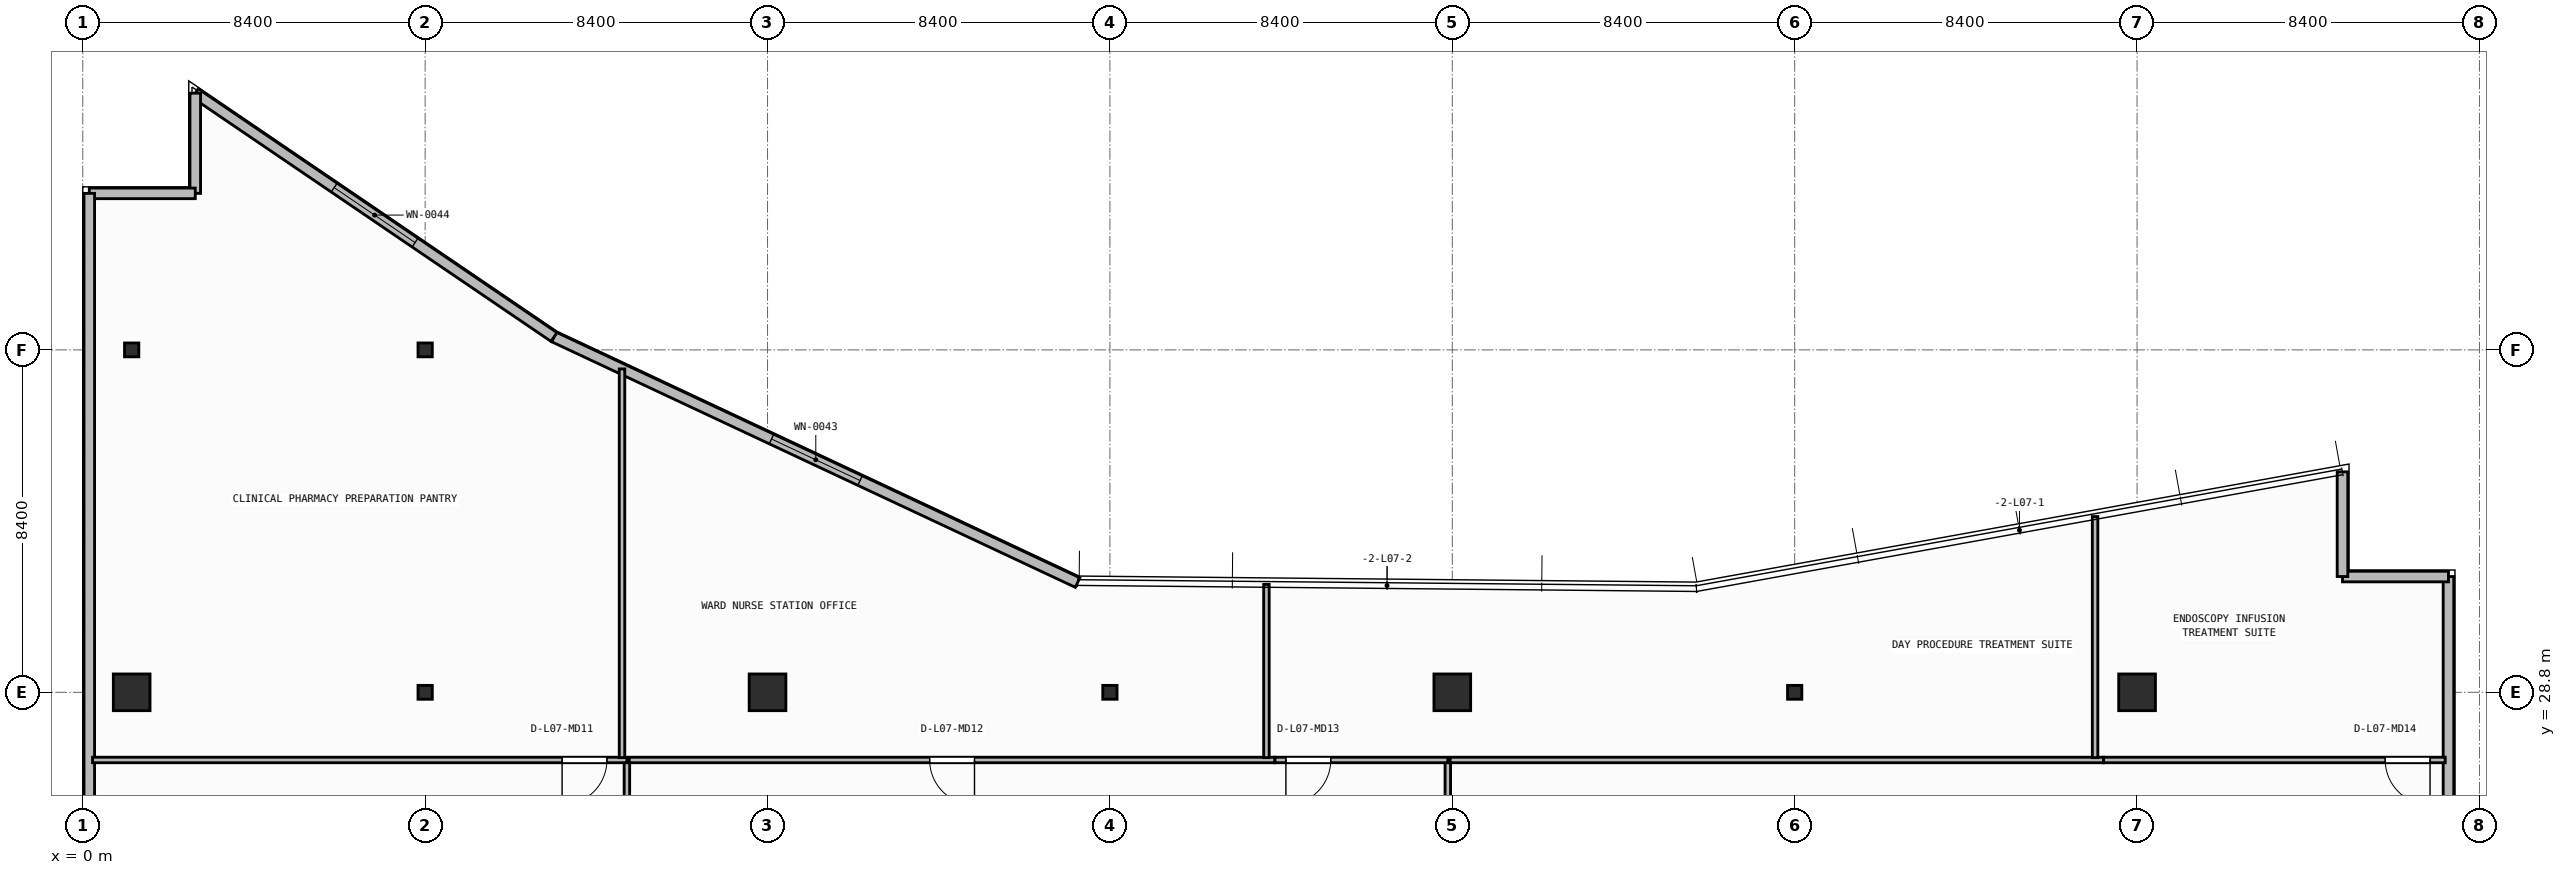
"""IFC4 building model, lengths in metres.
Left out: names, types, materials, properties, quantities, classifications, styles, units other than length and angle.
Written with IfcOpenShell. Run it as: python <this file> out.ifc"""

import sys

from ifc_helpers import new_model, si_unit, direction, frame, frame_2d, origin, origin_2d, place, context, subcontext, project, spatial, rectangle, i_section, extrude, element, fill, save


model = new_model("IFC4")
c1 = context("Model", 3, precision=1e-05, world=origin(), true_north=direction((0.0, 1.0)))
c2 = subcontext(c1, "Body", "Model", "MODEL_VIEW")
j1 = project(units=[si_unit("LENGTHUNIT", "METRE"), si_unit("PLANEANGLEUNIT", "RADIAN")], contexts=[c1])
p1 = place(None, origin())
s1 = spatial("IfcSite", under=j1, at=p1, CompositionType="ELEMENT")
p2 = place(p1, origin())
s2 = spatial("IfcBuilding", under=s1, at=p2, CompositionType="ELEMENT")
p3 = place(p2, frame((0.0, 0.0, 30.4)))
s3 = spatial("IfcBuildingStorey", under=s2, at=p3, CompositionType="ELEMENT", Elevation=30.4)
p4 = place(p3, frame((1.2, 28.8, 0.0), z_axis=(0.0, 0.0, 1.0), x_axis=(1.0, 0.0, 0.0)))
e1 = element("IfcColumn", 1, at=p4, inside=s3, PredefinedType="COLUMN", context=c2, shape_type="SweptSolid", body=[
    extrude(rectangle(XDim=0.9, YDim=0.9, at=origin_2d()), origin(), (0.0, 0.0, 1.0), 3.95),
])
p5 = place(p3, frame((8.4, 28.8, 0.0), z_axis=(0.0, 0.0, 1.0), x_axis=(1.0, 0.0, 0.0)))
e2 = element("IfcColumn", 2, at=p5, inside=s3, PredefinedType="COLUMN", context=c2, shape_type="SweptSolid", body=[
    extrude(i_section(OverallWidth=0.35, OverallDepth=0.34, WebThickness=0.016, FlangeThickness=0.028, at=origin_2d()), origin(), (0.0, 0.0, 1.0), 3.95),
])
p6 = place(p3, frame((16.8, 28.8, 0.0), z_axis=(0.0, 0.0, 1.0), x_axis=(1.0, 0.0, 0.0)))
e3 = element("IfcColumn", 3, at=p6, inside=s3, PredefinedType="COLUMN", context=c2, shape_type="SweptSolid", body=[
    extrude(rectangle(XDim=0.9, YDim=0.9, at=origin_2d()), origin(), (0.0, 0.0, 1.0), 3.95),
])
p7 = place(p3, frame((25.2, 28.8, 0.0), z_axis=(0.0, 0.0, 1.0), x_axis=(1.0, 0.0, 0.0)))
e4 = element("IfcColumn", 4, at=p7, inside=s3, PredefinedType="COLUMN", context=c2, shape_type="SweptSolid", body=[
    extrude(i_section(OverallWidth=0.35, OverallDepth=0.34, WebThickness=0.016, FlangeThickness=0.028, at=origin_2d()), origin(), (0.0, 0.0, 1.0), 3.95),
])
p8 = place(p3, frame((33.6, 28.8, 0.0), z_axis=(0.0, 0.0, 1.0), x_axis=(1.0, 0.0, 0.0)))
e5 = element("IfcColumn", 5, at=p8, inside=s3, PredefinedType="COLUMN", context=c2, shape_type="SweptSolid", body=[
    extrude(rectangle(XDim=0.9, YDim=0.9, at=origin_2d()), origin(), (0.0, 0.0, 1.0), 3.95),
])
p9 = place(p3, frame((42.0, 28.8, 0.0), z_axis=(0.0, 0.0, 1.0), x_axis=(1.0, 0.0, 0.0)))
e6 = element("IfcColumn", 6, at=p9, inside=s3, PredefinedType="COLUMN", context=c2, shape_type="SweptSolid", body=[
    extrude(i_section(OverallWidth=0.35, OverallDepth=0.34, WebThickness=0.016, FlangeThickness=0.028, at=origin_2d()), origin(), (0.0, 0.0, 1.0), 3.95),
])
p10 = place(p3, frame((50.4, 28.8, 0.0), z_axis=(0.0, 0.0, 1.0), x_axis=(1.0, 0.0, 0.0)))
e7 = element("IfcColumn", 7, at=p10, inside=s3, PredefinedType="COLUMN", context=c2, shape_type="SweptSolid", body=[
    extrude(rectangle(XDim=0.9, YDim=0.9, at=origin_2d()), origin(), (0.0, 0.0, 1.0), 3.95),
])
for number, where, z_axis, x_axis in (
    (8, (1.2, 37.2, 0.0), (0.0, 0.0, 1.0), (1.0, 0.0, 0.0)),
    (9, (8.4, 37.2, 0.0), (0.0, 0.0, 1.0), (1.0, 0.0, 0.0)),
):
    element("IfcColumn", number, at=place(p3, frame(where, z_axis=z_axis, x_axis=x_axis)), inside=s3, PredefinedType="COLUMN", context=c2, shape_type="SweptSolid", body=[
        extrude(i_section(OverallWidth=0.35, OverallDepth=0.34, WebThickness=0.016, FlangeThickness=0.028, at=origin_2d()), origin(), (0.0, 0.0, 1.0), 3.95),
    ])
p11 = place(p3, frame((58.04, 7.16, 0.0), z_axis=(0.0, 0.0, 1.0), x_axis=(0.0, 1.0, 0.0)))
e10 = element("IfcWall", 10, at=p11, inside=s3, PredefinedType="STANDARD", context=c2, shape_type="SweptSolid", body=[
    extrude(rectangle(XDim=24.48, YDim=0.26, at=frame_2d((12.24, 0.0))), origin(), (0.0, 0.0, 1.0), 3.71),
])
p12 = place(p11, frame((8.87, 0.0, 0.0)))
e11 = element("IfcOpeningElement", 11, at=p12, cuts=e10, PredefinedType="OPENING", context=c2, shape_type="SweptSolid", body=[
    extrude(rectangle(XDim=1.3, YDim=2.15, at=frame_2d((0.65, 1.075))), frame((0.0, 0.14, 0.0), z_axis=(0.0, -1.0, 0.0), x_axis=(1.0, 0.0, 0.0)), (0.0, 0.0, 1.0), 0.28),
])
p13 = place(p3, frame((58.04, 31.64, 0.0), z_axis=(0.0, 0.0, 1.0), x_axis=(-1.0, 0.0, 0.0)))
e12 = element("IfcWall", 12, at=p13, inside=s3, PredefinedType="STANDARD", context=c2, shape_type="SweptSolid", body=[
    extrude(rectangle(XDim=2.6, YDim=0.26, at=frame_2d((1.3, 0.0))), origin(), (0.0, 0.0, 1.0), 3.71),
])
p14 = place(p3, frame((55.44, 31.64, 0.0), z_axis=(0.0, 0.0, 1.0), x_axis=(0.0, 1.0, 0.0)))
e13 = element("IfcWall", 13, at=p14, inside=s3, PredefinedType="STANDARD", context=c2, shape_type="SweptSolid", body=[
    extrude(rectangle(XDim=2.569, YDim=0.26, at=frame_2d((1.284, 0.0))), origin(), (0.0, 0.0, 1.0), 3.71),
])
p15 = place(p3, frame((24.408, 31.492, 0.0), z_axis=(0.0, 0.0, 1.0), x_axis=(-0.905396522918, 0.424566998585, 0.0)))
e14 = element("IfcWall", 14, at=p15, inside=s3, PredefinedType="STANDARD", context=c2, shape_type="SweptSolid", body=[
    extrude(rectangle(XDim=14.189, YDim=0.26, at=frame_2d((7.095, 0.0))), origin(), (0.0, 0.0, 1.0), 3.71),
])
p16 = place(p15, frame((5.895, 0.0, 0.9)))
e15 = element("IfcOpeningElement", 15, at=p16, cuts=e14, PredefinedType="OPENING", context=c2, shape_type="SweptSolid", body=[
    extrude(rectangle(XDim=2.4, YDim=1.65, at=frame_2d((1.2, 0.825))), frame((0.0, 0.14, 0.0), z_axis=(0.0, -1.0, 0.0), x_axis=(1.0, 0.0, 0.0)), (0.0, 0.0, 1.0), 0.28),
])
p17 = place(p3, frame((11.561, 37.517, 0.0), z_axis=(0.0, 0.0, 1.0), x_axis=(-0.827064743936, 0.562106670782, 0.0)))
e16 = element("IfcWall", 16, at=p17, inside=s3, PredefinedType="STANDARD", context=c2, shape_type="SweptSolid", body=[
    extrude(rectangle(XDim=10.641, YDim=0.26, at=frame_2d((5.32, 0.0))), origin(), (0.0, 0.0, 1.0), 3.71),
])
p18 = place(p17, frame((4.12, 0.0, 0.9)))
e17 = element("IfcOpeningElement", 17, at=p18, cuts=e16, PredefinedType="OPENING", context=c2, shape_type="SweptSolid", body=[
    extrude(rectangle(XDim=2.4, YDim=1.65, at=frame_2d((1.2, 0.825))), frame((0.0, 0.14, 0.0), z_axis=(0.0, -1.0, 0.0), x_axis=(1.0, 0.0, 0.0)), (0.0, 0.0, 1.0), 0.28),
])
p19 = place(p3, frame((2.76, 43.498, 0.0), z_axis=(0.0, 0.0, 1.0), x_axis=(0.0, -1.0, 0.0)))
e18 = element("IfcWall", 18, at=p19, inside=s3, PredefinedType="STANDARD", context=c2, shape_type="SweptSolid", body=[
    extrude(rectangle(XDim=2.458, YDim=0.26, at=frame_2d((1.229, 0.0))), origin(), (0.0, 0.0, 1.0), 3.71),
])
p20 = place(p3, frame((2.76, 41.04, 0.0), z_axis=(0.0, 0.0, 1.0), x_axis=(-1.0, 0.0, 0.0)))
e19 = element("IfcWall", 19, at=p20, inside=s3, PredefinedType="STANDARD", context=c2, shape_type="SweptSolid", body=[
    extrude(rectangle(XDim=2.6, YDim=0.26, at=frame_2d((1.3, 0.0))), origin(), (0.0, 0.0, 1.0), 3.71),
])
p21 = place(p3, frame((0.16, 41.04, 0.0), z_axis=(0.0, 0.0, 1.0), x_axis=(0.0, -1.0, 0.0)))
e20 = element("IfcWall", 20, at=p21, inside=s3, PredefinedType="STANDARD", context=c2, shape_type="SweptSolid", body=[
    extrude(rectangle(XDim=38.28, YDim=0.26, at=frame_2d((19.14, 0.0))), origin(), (0.0, 0.0, 1.0), 3.71),
])
p22 = place(p21, frame((28.15, 0.0, 0.9)))
e21 = element("IfcOpeningElement", 21, at=p22, cuts=e20, PredefinedType="OPENING", context=c2, shape_type="SweptSolid", body=[
    extrude(rectangle(XDim=2.4, YDim=1.65, at=frame_2d((1.2, 0.825))), frame((0.0, 0.14, 0.0), z_axis=(0.0, -1.0, 0.0), x_axis=(1.0, 0.0, 0.0)), (0.0, 0.0, 1.0), 0.28),
])
p23 = place(p3, frame((13.35, 20.698, 0.0), z_axis=(0.0, 0.0, 1.0), x_axis=(0.0, 1.0, 0.0)))
e22 = element("IfcWall", 22, at=p23, inside=s3, PredefinedType="PARTITIONING", context=c2, shape_type="SweptSolid", body=[
    extrude(rectangle(XDim=6.442, YDim=0.135, at=frame_2d((3.221, 0.0))), origin(), (0.0, 0.0, 1.0), 3.71),
])
p24 = place(p3, frame((13.35, 27.14, 0.0), z_axis=(0.0, 0.0, 1.0), x_axis=(-1.0, 0.0, 0.0)))
e23 = element("IfcWall", 23, at=p24, inside=s3, PredefinedType="PARTITIONING", context=c2, shape_type="SweptSolid", body=[
    extrude(rectangle(XDim=13.11, YDim=0.135, at=frame_2d((6.555, 0.0))), origin(), (0.0, 0.0, 1.0), 3.71),
])
p25 = place(p24, frame((0.49, 0.0, 0.0)))
e24 = element("IfcOpeningElement", 24, at=p25, cuts=e23, PredefinedType="OPENING", context=c2, shape_type="SweptSolid", body=[
    extrude(rectangle(XDim=1.1, YDim=2.1, at=frame_2d((0.55, 1.05))), frame((0.0, 0.077, 0.0), z_axis=(0.0, -1.0, 0.0), x_axis=(1.0, 0.0, 0.0)), (0.0, 0.0, 1.0), 0.155),
])
p26 = place(p3, frame((33.49, 20.698, 0.0), z_axis=(0.0, 0.0, 1.0), x_axis=(0.0, 1.0, 0.0)))
e25 = element("IfcWall", 25, at=p26, inside=s3, PredefinedType="PARTITIONING", context=c2, shape_type="SweptSolid", body=[
    extrude(rectangle(XDim=6.442, YDim=0.135, at=frame_2d((3.221, 0.0))), origin(), (0.0, 0.0, 1.0), 3.073),
])
p27 = place(p3, frame((29.248, 27.14, 0.0), z_axis=(0.0, 0.0, 1.0), x_axis=(-1.0, 0.0, 0.0)))
e26 = element("IfcWall", 26, at=p27, inside=s3, PredefinedType="PARTITIONING", context=c2, shape_type="SweptSolid", body=[
    extrude(rectangle(XDim=15.84, YDim=0.135, at=frame_2d((7.92, 0.0))), origin(), (0.0, 0.0, 1.0), 3.71),
])
p28 = place(p27, frame((7.37, 0.0, 0.0)))
e27 = element("IfcOpeningElement", 27, at=p28, cuts=e26, PredefinedType="OPENING", context=c2, shape_type="SweptSolid", body=[
    extrude(rectangle(XDim=1.1, YDim=2.1, at=frame_2d((0.55, 1.05))), frame((0.0, 0.077, 0.0), z_axis=(0.0, -1.0, 0.0), x_axis=(1.0, 0.0, 0.0)), (0.0, 0.0, 1.0), 0.155),
])
p29 = place(p3, frame((33.49, 27.14, 0.0), z_axis=(0.0, 0.0, 1.0), x_axis=(-1.0, 0.0, 0.0)))
e28 = element("IfcWall", 28, at=p29, inside=s3, PredefinedType="PARTITIONING", context=c2, shape_type="SweptSolid", body=[
    extrude(rectangle(XDim=4.24, YDim=0.135, at=frame_2d((2.12, 0.0))), origin(), (0.0, 0.0, 1.0), 3.71),
])
p30 = place(p29, frame((2.872, 0.0, 0.0)))
e29 = element("IfcOpeningElement", 29, at=p30, cuts=e28, PredefinedType="OPENING", context=c2, shape_type="SweptSolid", body=[
    extrude(rectangle(XDim=1.1, YDim=2.1, at=frame_2d((0.55, 1.05))), frame((0.0, 0.077, 0.0), z_axis=(0.0, -1.0, 0.0), x_axis=(1.0, 0.0, 0.0)), (0.0, 0.0, 1.0), 0.155),
])
p31 = place(p3, frame((49.577, 27.14, 0.0), z_axis=(0.0, 0.0, 1.0), x_axis=(-1.0, 0.0, 0.0)))
e30 = element("IfcWall", 30, at=p31, inside=s3, PredefinedType="PARTITIONING", context=c2, shape_type="SweptSolid", body=[
    extrude(rectangle(XDim=16.03, YDim=0.135, at=frame_2d((8.015, 0.0))), origin(), (0.0, 0.0, 1.0), 3.71),
])
p32 = place(p3, frame((57.96, 27.14, 0.0), z_axis=(0.0, 0.0, 1.0), x_axis=(-1.0, 0.0, 0.0)))
e31 = element("IfcWall", 31, at=p32, inside=s3, PredefinedType="PARTITIONING", context=c2, shape_type="SweptSolid", body=[
    extrude(rectangle(XDim=8.38, YDim=0.135, at=frame_2d((4.19, 0.0))), origin(), (0.0, 0.0, 1.0), 3.71),
])
p33 = place(p32, frame((0.372, 0.0, 0.0)))
e32 = element("IfcOpeningElement", 32, at=p33, cuts=e31, PredefinedType="OPENING", context=c2, shape_type="SweptSolid", body=[
    extrude(rectangle(XDim=1.1, YDim=2.1, at=frame_2d((0.55, 1.05))), frame((0.0, 0.077, 0.0), z_axis=(0.0, -1.0, 0.0), x_axis=(1.0, 0.0, 0.0)), (0.0, 0.0, 1.0), 0.155),
])
p34 = place(p3, frame((13.23, 27.198, 0.0), z_axis=(0.0, 0.0, 1.0), x_axis=(0.0, 1.0, 0.0)))
e33 = element("IfcWall", 33, at=p34, inside=s3, PredefinedType="PARTITIONING", context=c2, shape_type="SweptSolid", body=[
    extrude(rectangle(XDim=9.536, YDim=0.135, at=frame_2d((4.768, 0.0))), origin(), (0.0, 0.0, 1.0), 3.71),
])
p35 = place(p3, frame((29.04, 27.198, 0.0), z_axis=(0.0, 0.0, 1.0), x_axis=(0.0, 1.0, 0.0)))
e34 = element("IfcWall", 34, at=p35, inside=s3, PredefinedType="PARTITIONING", context=c2, shape_type="SweptSolid", body=[
    extrude(rectangle(XDim=4.25, YDim=0.135, at=frame_2d((2.125, 0.0))), origin(), (0.0, 0.0, 1.0), 3.71),
])
p36 = place(p3, frame((49.37, 27.198, 0.0), z_axis=(0.0, 0.0, 1.0), x_axis=(0.0, 1.0, 0.0)))
e35 = element("IfcWall", 35, at=p36, inside=s3, PredefinedType="PARTITIONING", context=c2, shape_type="SweptSolid", body=[
    extrude(rectangle(XDim=5.914, YDim=0.135, at=frame_2d((2.957, 0.0))), origin(), (0.0, 0.0, 1.0), 3.71),
])
p37 = place(p16, origin())
e36 = element("IfcWindow", 36, at=p37, inside=s3, PartitioningType="SINGLE_PANEL", PredefinedType="WINDOW", context=c2, shape_type="SweptSolid", body=[
    extrude(rectangle(XDim=2.4, YDim=1.65, at=frame_2d((1.2, 0.825))), frame((0.0, 0.03, 0.0), z_axis=(0.0, -1.0, 0.0), x_axis=(1.0, 0.0, 0.0)), (0.0, 0.0, 1.0), 0.06),
])
fill(e15, e36)
p38 = place(p18, origin())
e37 = element("IfcWindow", 37, at=p38, inside=s3, PartitioningType="SINGLE_PANEL", PredefinedType="WINDOW", context=c2, shape_type="SweptSolid", body=[
    extrude(rectangle(XDim=2.4, YDim=1.65, at=frame_2d((1.2, 0.825))), frame((0.0, 0.03, 0.0), z_axis=(0.0, -1.0, 0.0), x_axis=(1.0, 0.0, 0.0)), (0.0, 0.0, 1.0), 0.06),
])
fill(e17, e37)
p39 = place(p25, origin())
e38 = element("IfcDoor", 38, at=p39, inside=s3, OperationType="SINGLE_SWING_RIGHT", PredefinedType="DOOR", context=c2, shape_type="SweptSolid", body=[
    extrude(rectangle(XDim=1.1, YDim=2.1, at=frame_2d((0.55, 1.05))), frame((0.0, 0.025, 0.0), z_axis=(0.0, -1.0, 0.0), x_axis=(1.0, 0.0, 0.0)), (0.0, 0.0, 1.0), 0.05),
])
fill(e24, e38)
p40 = place(p28, origin())
e39 = element("IfcDoor", 39, at=p40, inside=s3, OperationType="SINGLE_SWING_LEFT", PredefinedType="DOOR", context=c2, shape_type="SweptSolid", body=[
    extrude(rectangle(XDim=1.1, YDim=2.1, at=frame_2d((0.55, 1.05))), frame((0.0, 0.025, 0.0), z_axis=(0.0, -1.0, 0.0), x_axis=(1.0, 0.0, 0.0)), (0.0, 0.0, 1.0), 0.05),
])
fill(e27, e39)
p41 = place(p30, origin())
e40 = element("IfcDoor", 40, at=p41, inside=s3, OperationType="SINGLE_SWING_RIGHT", PredefinedType="DOOR", context=c2, shape_type="SweptSolid", body=[
    extrude(rectangle(XDim=1.1, YDim=2.1, at=frame_2d((0.55, 1.05))), frame((0.0, 0.025, 0.0), z_axis=(0.0, -1.0, 0.0), x_axis=(1.0, 0.0, 0.0)), (0.0, 0.0, 1.0), 0.05),
])
fill(e29, e40)
p42 = place(p33, origin())
e41 = element("IfcDoor", 41, at=p42, inside=s3, OperationType="SINGLE_SWING_LEFT", PredefinedType="DOOR", context=c2, shape_type="SweptSolid", body=[
    extrude(rectangle(XDim=1.1, YDim=2.1, at=frame_2d((0.55, 1.05))), frame((0.0, 0.025, 0.0), z_axis=(0.0, -1.0, 0.0), x_axis=(1.0, 0.0, 0.0)), (0.0, 0.0, 1.0), 0.05),
])
fill(e32, e41)
save(model, sys.argv[1])
